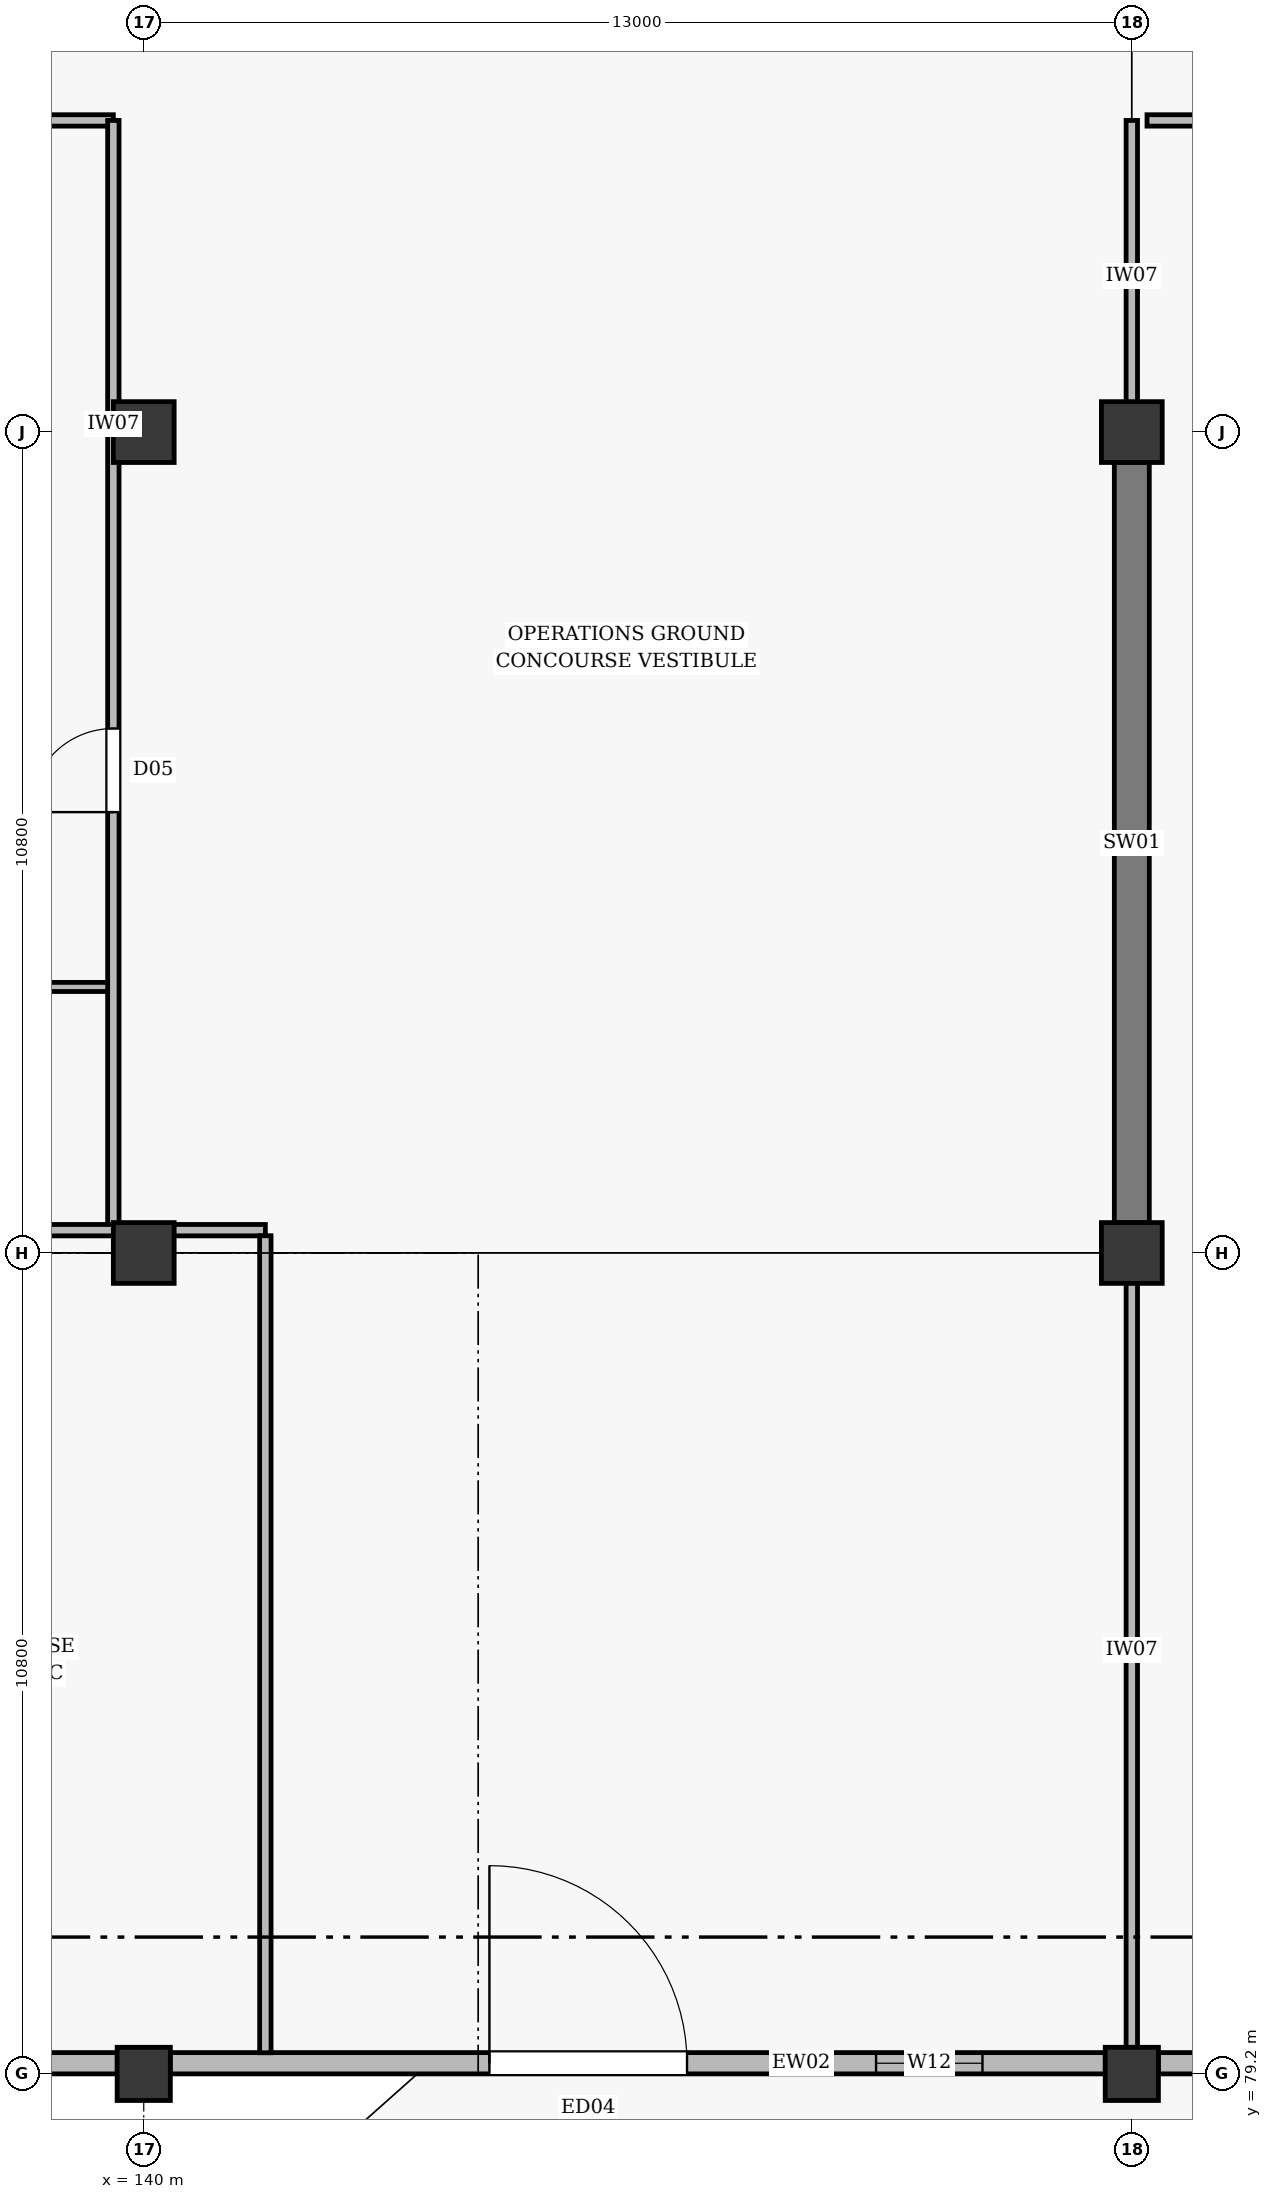
"""IFC4 building model, lengths in metres.
Left out: names, types, materials, properties, quantities, classifications, styles, units other than length and angle.
Written with IfcOpenShell. Run it as: python <this file> out.ifc"""

import sys

from ifc_helpers import new_model, si_unit, direction, frame, frame_2d, origin, origin_2d, place, context, subcontext, project, spatial, rectangle, extrude, element, fill, save


model = new_model("IFC4")
c1 = context("Model", 3, precision=1e-05, world=origin(), true_north=direction((0.0, 1.0)))
c2 = subcontext(c1, "Body", "Model", "MODEL_VIEW")
j1 = project(units=[si_unit("LENGTHUNIT", "METRE"), si_unit("PLANEANGLEUNIT", "RADIAN")], contexts=[c1])
p1 = place(None, origin())
s1 = spatial("IfcSite", under=j1, at=p1, CompositionType="ELEMENT")
p2 = place(p1, origin())
s2 = spatial("IfcBuilding", under=s1, at=p2, CompositionType="ELEMENT")
p3 = place(p2, origin())
s3 = spatial("IfcBuildingStorey", under=s2, at=p3, CompositionType="ELEMENT", Elevation=0.0)
p4 = place(p3, frame((140.0, 79.2, 0.0), z_axis=(0.0, 0.0, 1.0), x_axis=(1.0, 0.0, 0.0)))
e1 = element("IfcColumn", 1, at=p4, inside=s3, PredefinedType="COLUMN", context=c2, shape_type="SweptSolid", body=[
    extrude(rectangle(XDim=0.7, YDim=0.7, at=origin_2d()), origin(), (0.0, 0.0, 1.0), 6.6),
])
for number, where, z_axis, x_axis in (
    (2, (140.0, 90.0, 0.0), (0.0, 0.0, 1.0), (1.0, 0.0, 0.0)),
    (3, (140.0, 100.8, 0.0), (0.0, 0.0, 1.0), (1.0, 0.0, 0.0)),
):
    element("IfcColumn", number, at=place(p3, frame(where, z_axis=z_axis, x_axis=x_axis)), inside=s3, PredefinedType="COLUMN", context=c2, shape_type="SweptSolid", body=[
        extrude(rectangle(XDim=0.8, YDim=0.8, at=origin_2d()), origin(), (0.0, 0.0, 1.0), 6.6),
    ])
p5 = place(p3, frame((153.0, 79.2, 0.0), z_axis=(0.0, 0.0, 1.0), x_axis=(1.0, 0.0, 0.0)))
e4 = element("IfcColumn", 4, at=p5, inside=s3, PredefinedType="COLUMN", context=c2, shape_type="SweptSolid", body=[
    extrude(rectangle(XDim=0.7, YDim=0.7, at=origin_2d()), origin(), (0.0, 0.0, 1.0), 6.6),
])
for number, where, z_axis, x_axis in (
    (5, (153.0, 90.0, 0.0), (0.0, 0.0, 1.0), (1.0, 0.0, 0.0)),
    (6, (153.0, 100.8, 0.0), (0.0, 0.0, 1.0), (1.0, 0.0, 0.0)),
):
    element("IfcColumn", number, at=place(p3, frame(where, z_axis=z_axis, x_axis=x_axis)), inside=s3, PredefinedType="COLUMN", context=c2, shape_type="SweptSolid", body=[
        extrude(rectangle(XDim=0.8, YDim=0.8, at=origin_2d()), origin(), (0.0, 0.0, 1.0), 6.6),
    ])
p6 = place(p3, frame((153.0, 90.398, 0.0), z_axis=(0.0, 0.0, 1.0), x_axis=(0.0, 1.0, 0.0)))
e7 = element("IfcWall", 7, at=p6, inside=s3, PredefinedType="SHEAR", context=c2, shape_type="SweptSolid", body=[
    extrude(rectangle(XDim=10.004, YDim=0.46, at=frame_2d((5.002, 0.0))), origin(), (0.0, 0.0, 1.0), 6.35),
])
p7 = place(p3, frame((128.348, 79.34, 0.0), z_axis=(0.0, 0.0, 1.0), x_axis=(1.0, 0.0, 0.0)))
e8 = element("IfcWall", 8, at=p7, inside=s3, PredefinedType="STANDARD", context=c2, shape_type="SweptSolid", body=[
    extrude(rectangle(XDim=11.304, YDim=0.28, at=frame_2d((5.652, 0.0))), origin(), (0.0, 0.0, 1.0), 5.69),
])
p8 = place(p7, frame((0.551, 0.0, 0.75)))
e9 = element("IfcOpeningElement", 9, at=p8, cuts=e8, PredefinedType="OPENING", context=c2, shape_type="SweptSolid", body=[
    extrude(rectangle(XDim=3.2, YDim=2.8, at=frame_2d((1.6, 1.4))), frame((0.0, 0.152, 0.0), z_axis=(0.0, -1.0, 0.0), x_axis=(1.0, 0.0, 0.0)), (0.0, 0.0, 1.0), 0.304),
])
p9 = place(p7, frame((5.902, 0.0, 0.75)))
e10 = element("IfcOpeningElement", 10, at=p9, cuts=e8, PredefinedType="OPENING", context=c2, shape_type="SweptSolid", body=[
    extrude(rectangle(XDim=2.4, YDim=2.4, at=frame_2d((1.2, 1.2))), frame((0.0, 0.152, 0.0), z_axis=(0.0, -1.0, 0.0), x_axis=(1.0, 0.0, 0.0)), (0.0, 0.0, 1.0), 0.304),
])
p10 = place(p7, frame((8.553, 0.0, 1.05)))
e11 = element("IfcOpeningElement", 11, at=p10, cuts=e8, PredefinedType="OPENING", context=c2, shape_type="SweptSolid", body=[
    extrude(rectangle(XDim=1.4, YDim=1.8, at=frame_2d((0.7, 0.9))), frame((0.0, 0.152, 0.0), z_axis=(0.0, -1.0, 0.0), x_axis=(1.0, 0.0, 0.0)), (0.0, 0.0, 1.0), 0.304),
])
p11 = place(p3, frame((140.348, 79.34, 0.0), z_axis=(0.0, 0.0, 1.0), x_axis=(1.0, 0.0, 0.0)))
e12 = element("IfcWall", 12, at=p11, inside=s3, PredefinedType="STANDARD", context=c2, shape_type="SweptSolid", body=[
    extrude(rectangle(XDim=12.304, YDim=0.28, at=frame_2d((6.152, 0.0))), origin(), (0.0, 0.0, 1.0), 5.69),
])
p12 = place(p11, frame((4.2, 0.0, 0.005)))
e13 = element("IfcOpeningElement", 13, at=p12, cuts=e12, PredefinedType="OPENING", context=c2, shape_type="SweptSolid", body=[
    extrude(rectangle(XDim=2.6, YDim=2.6, at=frame_2d((1.3, 1.3))), frame((0.0, 0.152, 0.0), z_axis=(0.0, -1.0, 0.0), x_axis=(1.0, 0.0, 0.0)), (0.0, 0.0, 1.0), 0.304),
])
p13 = place(p11, frame((9.287, 0.0, 1.05)))
e14 = element("IfcOpeningElement", 14, at=p13, cuts=e12, PredefinedType="OPENING", context=c2, shape_type="SweptSolid", body=[
    extrude(rectangle(XDim=1.4, YDim=1.8, at=frame_2d((0.7, 0.9))), frame((0.0, 0.152, 0.0), z_axis=(0.0, -1.0, 0.0), x_axis=(1.0, 0.0, 0.0)), (0.0, 0.0, 1.0), 0.304),
])
p14 = place(p3, frame((153.348, 79.34, 0.0), z_axis=(0.0, 0.0, 1.0), x_axis=(1.0, 0.0, 0.0)))
e15 = element("IfcWall", 15, at=p14, inside=s3, PredefinedType="STANDARD", context=c2, shape_type="SweptSolid", body=[
    extrude(rectangle(XDim=12.754, YDim=0.28, at=frame_2d((6.377, 0.0))), origin(), (0.0, 0.0, 1.0), 5.69),
])
p15 = place(p14, frame((0.792, 0.0, 0.75)))
e16 = element("IfcOpeningElement", 16, at=p15, cuts=e15, PredefinedType="OPENING", context=c2, shape_type="SweptSolid", body=[
    extrude(rectangle(XDim=3.2, YDim=2.8, at=frame_2d((1.6, 1.4))), frame((0.0, 0.152, 0.0), z_axis=(0.0, -1.0, 0.0), x_axis=(1.0, 0.0, 0.0)), (0.0, 0.0, 1.0), 0.304),
])
p16 = place(p14, frame((5.177, 0.0, 0.75)))
e17 = element("IfcOpeningElement", 17, at=p16, cuts=e15, PredefinedType="OPENING", context=c2, shape_type="SweptSolid", body=[
    extrude(rectangle(XDim=2.4, YDim=2.4, at=frame_2d((1.2, 1.2))), frame((0.0, 0.152, 0.0), z_axis=(0.0, -1.0, 0.0), x_axis=(1.0, 0.0, 0.0)), (0.0, 0.0, 1.0), 0.304),
])
p17 = place(p14, frame((9.662, 0.0, 1.05)))
e18 = element("IfcOpeningElement", 18, at=p17, cuts=e15, PredefinedType="OPENING", context=c2, shape_type="SweptSolid", body=[
    extrude(rectangle(XDim=1.4, YDim=1.8, at=frame_2d((0.7, 0.9))), frame((0.0, 0.152, 0.0), z_axis=(0.0, -1.0, 0.0), x_axis=(1.0, 0.0, 0.0)), (0.0, 0.0, 1.0), 0.304),
])
p18 = place(p3, frame((118.338, 104.9, 0.0), z_axis=(0.0, 0.0, 1.0), x_axis=(1.0, 0.0, 0.0)))
e19 = element("IfcWall", 19, at=p18, inside=s3, PredefinedType="PARTITIONING", context=c2, shape_type="SweptSolid", body=[
    extrude(rectangle(XDim=21.262, YDim=0.15, at=frame_2d((10.631, 0.0))), origin(), (0.0, 0.0, 1.0), 5.89),
])
p19 = place(p18, frame((8.262, 0.0, 0.005)))
e20 = element("IfcOpeningElement", 20, at=p19, cuts=e19, PredefinedType="OPENING", context=c2, shape_type="SweptSolid", body=[
    extrude(rectangle(XDim=1.1, YDim=2.1, at=frame_2d((0.55, 1.05))), frame((0.0, 0.087, 0.0), z_axis=(0.0, -1.0, 0.0), x_axis=(1.0, 0.0, 0.0)), (0.0, 0.0, 1.0), 0.174),
])
p20 = place(p3, frame((153.2, 104.9, 0.0), z_axis=(0.0, 0.0, 1.0), x_axis=(1.0, 0.0, 0.0)))
e21 = element("IfcWall", 21, at=p20, inside=s3, PredefinedType="PARTITIONING", context=c2, shape_type="SweptSolid", body=[
    extrude(rectangle(XDim=26.562, YDim=0.15, at=frame_2d((13.281, 0.0))), origin(), (0.0, 0.0, 1.0), 5.89),
])
p21 = place(p20, frame((10.0, 0.0, 0.005)))
e22 = element("IfcOpeningElement", 22, at=p21, cuts=e21, PredefinedType="OPENING", context=c2, shape_type="SweptSolid", body=[
    extrude(rectangle(XDim=1.65, YDim=2.2, at=frame_2d((0.825, 1.1))), frame((0.0, 0.087, 0.0), z_axis=(0.0, -1.0, 0.0), x_axis=(1.0, 0.0, 0.0)), (0.0, 0.0, 1.0), 0.174),
])
p22 = place(p3, frame((128.6, 93.5, 0.0), z_axis=(0.0, 0.0, 1.0), x_axis=(1.0, 0.0, 0.0)))
e23 = element("IfcWall", 23, at=p22, inside=s3, PredefinedType="PARTITIONING", context=c2, shape_type="SweptSolid", body=[
    extrude(rectangle(XDim=11.0, YDim=0.12, at=frame_2d((5.5, 0.0))), origin(), (0.0, 0.0, 1.0), 5.89),
])
p23 = place(p3, frame((139.6, 90.3, 0.0), z_axis=(0.0, 0.0, 1.0), x_axis=(0.0, 1.0, 0.0)))
e24 = element("IfcWall", 24, at=p23, inside=s3, PredefinedType="PARTITIONING", context=c2, shape_type="SweptSolid", body=[
    extrude(rectangle(XDim=14.6, YDim=0.15, at=frame_2d((7.3, 0.0))), origin(), (0.0, 0.0, 1.0), 5.74),
])
p24 = place(p23, frame((5.5, 0.0, 0.005)))
e25 = element("IfcOpeningElement", 25, at=p24, cuts=e24, PredefinedType="OPENING", context=c2, shape_type="SweptSolid", body=[
    extrude(rectangle(XDim=1.1, YDim=2.1, at=frame_2d((0.55, 1.05))), frame((0.0, 0.087, 0.0), z_axis=(0.0, -1.0, 0.0), x_axis=(1.0, 0.0, 0.0)), (0.0, 0.0, 1.0), 0.174),
])
p25 = place(p3, frame((128.348, 90.3, 0.0), z_axis=(0.0, 0.0, 1.0), x_axis=(1.0, 0.0, 0.0)))
e26 = element("IfcWall", 26, at=p25, inside=s3, PredefinedType="PARTITIONING", context=c2, shape_type="SweptSolid", body=[
    extrude(rectangle(XDim=13.252, YDim=0.15, at=frame_2d((6.626, 0.0))), origin(), (0.0, 0.0, 1.0), 5.74),
])
p26 = place(p25, frame((2.452, 0.0, 0.005)))
e27 = element("IfcOpeningElement", 27, at=p26, cuts=e26, PredefinedType="OPENING", context=c2, shape_type="SweptSolid", body=[
    extrude(rectangle(XDim=0.92, YDim=2.12, at=frame_2d((0.46, 1.06))), frame((0.0, 0.087, 0.0), z_axis=(0.0, -1.0, 0.0), x_axis=(1.0, 0.0, 0.0)), (0.0, 0.0, 1.0), 0.174),
])
p27 = place(p25, frame((7.452, 0.0, 0.005)))
e28 = element("IfcOpeningElement", 28, at=p27, cuts=e26, PredefinedType="OPENING", context=c2, shape_type="SweptSolid", body=[
    extrude(rectangle(XDim=1.05, YDim=2.15, at=frame_2d((0.525, 1.075))), frame((0.0, 0.087, 0.0), z_axis=(0.0, -1.0, 0.0), x_axis=(1.0, 0.0, 0.0)), (0.0, 0.0, 1.0), 0.174),
])
p28 = place(p3, frame((141.6, 79.478, 0.0), z_axis=(0.0, 0.0, 1.0), x_axis=(0.0, 1.0, 0.0)))
e29 = element("IfcWall", 29, at=p28, inside=s3, PredefinedType="PARTITIONING", context=c2, shape_type="SweptSolid", body=[
    extrude(rectangle(XDim=10.749, YDim=0.15, at=frame_2d((5.375, 0.0))), origin(), (0.0, 0.0, 1.0), 5.74),
])
p29 = place(p3, frame((153.0, 79.548, 0.0), z_axis=(0.0, 0.0, 1.0), x_axis=(0.0, 1.0, 0.0)))
e30 = element("IfcWall", 30, at=p29, inside=s3, PredefinedType="PARTITIONING", context=c2, shape_type="SweptSolid", body=[
    extrude(rectangle(XDim=10.452, YDim=0.15, at=frame_2d((5.226, 0.0))), origin(), (0.0, 0.0, 1.0), 5.69),
])
p30 = place(p3, frame((153.0, 100.8, 0.0), z_axis=(0.0, 0.0, 1.0), x_axis=(0.0, 1.0, 0.0)))
e31 = element("IfcWall", 31, at=p30, inside=s3, PredefinedType="PARTITIONING", context=c2, shape_type="SweptSolid", body=[
    extrude(rectangle(XDim=4.1, YDim=0.15, at=frame_2d((2.05, 0.0))), origin(), (0.0, 0.0, 1.0), 5.74),
])
p31 = place(p12, origin())
e32 = element("IfcDoor", 32, at=p31, inside=s3, OperationType="DOUBLE_DOOR_SINGLE_SWING", PredefinedType="DOOR", context=c2, shape_type="SweptSolid", body=[
    extrude(rectangle(XDim=2.6, YDim=2.6, at=frame_2d((1.3, 1.3))), frame((0.0, 0.025, 0.0), z_axis=(0.0, -1.0, 0.0), x_axis=(1.0, 0.0, 0.0)), (0.0, 0.0, 1.0), 0.05),
])
fill(e13, e32)
p32 = place(p13, origin())
e33 = element("IfcWindow", 33, at=p32, inside=s3, PartitioningType="DOUBLE_PANEL_VERTICAL", PredefinedType="WINDOW", context=c2, shape_type="SweptSolid", body=[
    extrude(rectangle(XDim=1.4, YDim=1.8, at=frame_2d((0.7, 0.9))), frame((0.0, 0.03, 0.0), z_axis=(0.0, -1.0, 0.0), x_axis=(1.0, 0.0, 0.0)), (0.0, 0.0, 1.0), 0.06),
])
fill(e14, e33)
p33 = place(p24, origin())
e34 = element("IfcDoor", 34, at=p33, inside=s3, OperationType="SINGLE_SWING_LEFT", PredefinedType="DOOR", context=c2, shape_type="SweptSolid", body=[
    extrude(rectangle(XDim=1.1, YDim=2.1, at=frame_2d((0.55, 1.05))), frame((0.0, 0.025, 0.0), z_axis=(0.0, -1.0, 0.0), x_axis=(1.0, 0.0, 0.0)), (0.0, 0.0, 1.0), 0.05),
])
fill(e25, e34)
save(model, sys.argv[1])
